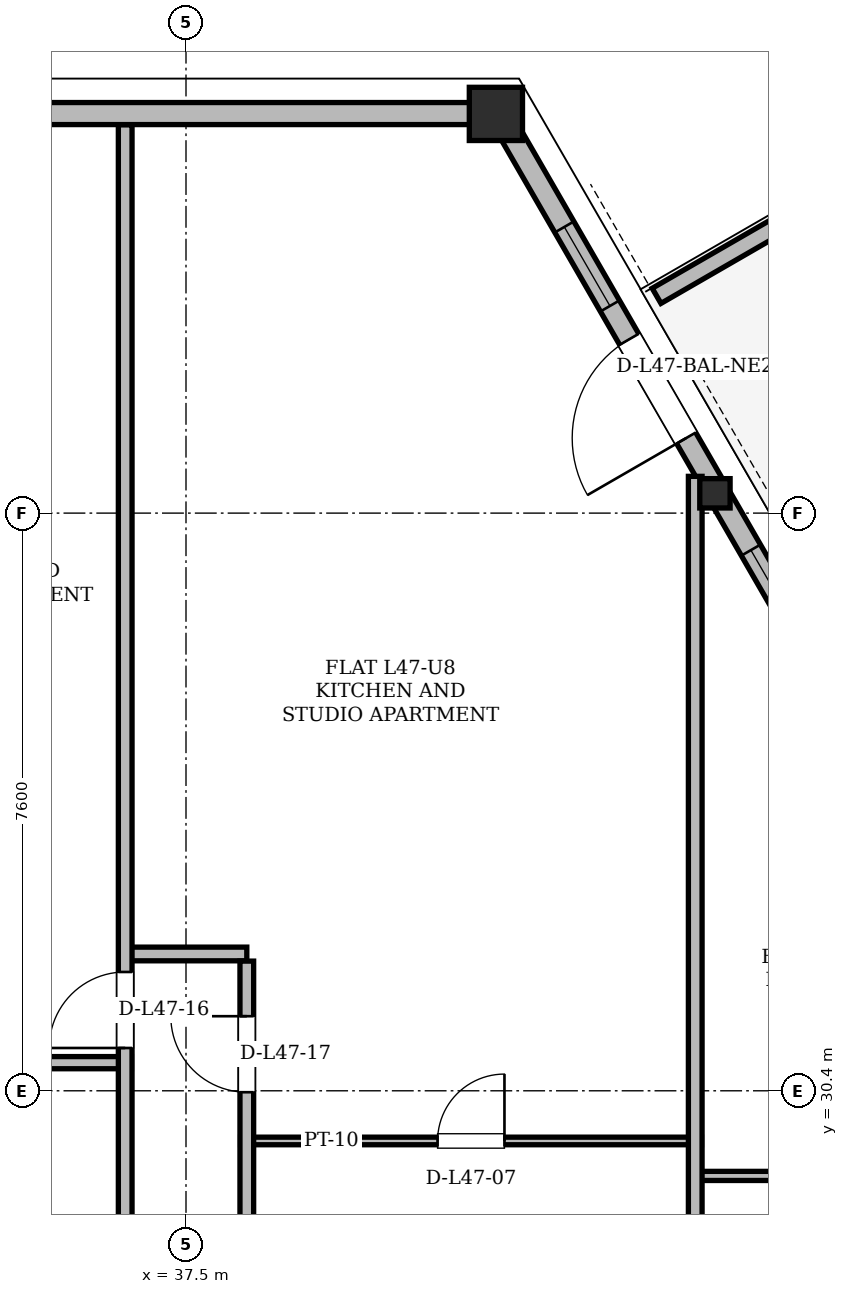
"""IFC4 building model, lengths in metres.
Left out: names, types, materials, properties, quantities, classifications, styles, units other than length and angle.
Written with IfcOpenShell. Run it as: python <this file> out.ifc"""

import sys

from ifc_helpers import new_model, si_unit, direction, frame, frame_2d, origin, origin_2d, place, context, subcontext, project, spatial, polyline, rectangle, hollow_rectangle, i_section, outline, extrude, element, fill, save


model = new_model("IFC4")
c1 = context("Model", 3, precision=1e-05, world=origin(), true_north=direction((0.0, 1.0)))
c2 = subcontext(c1, "Body", "Model", "MODEL_VIEW")
j1 = project(units=[si_unit("LENGTHUNIT", "METRE"), si_unit("PLANEANGLEUNIT", "RADIAN")], contexts=[c1])
p1 = place(None, origin())
s1 = spatial("IfcSite", under=j1, at=p1, CompositionType="ELEMENT")
p2 = place(p1, origin())
s2 = spatial("IfcBuilding", under=s1, at=p2, CompositionType="ELEMENT")
p3 = place(p2, frame((0.0, 0.0, 178.2)))
s3 = spatial("IfcBuildingStorey", under=s2, at=p3, CompositionType="ELEMENT", Elevation=178.2)
p4 = place(p3, frame((41.616, 43.257, 0.005), z_axis=(-0.02168370496, -0.002583011876, 0.999761544064), x_axis=(0.118285967789, -0.992979571705, 0.0)))
e1 = element("IfcColumn", 1, at=p4, inside=s3, PredefinedType="COLUMN", context=c2, shape_type="SweptSolid", body=[
    extrude(hollow_rectangle(XDim=0.7, YDim=0.7, WallThickness=0.055, at=origin_2d()), origin(), (0.0, 0.0, 1.0), 3.592),
])
p5 = place(p3, frame((44.496, 38.269, 0.005), z_axis=(-0.02032462297, -0.004962198919, 0.999781119187), x_axis=(0.237180560732, -0.971465584368, 0.0)))
e2 = element("IfcColumn", 2, at=p5, inside=s3, PredefinedType="COLUMN", context=c2, shape_type="SweptSolid", body=[
    extrude(i_section(OverallWidth=0.399, OverallDepth=0.386, WebThickness=0.021, FlangeThickness=0.033, at=origin_2d()), origin(), (0.0, 0.0, 1.0), 3.592),
])
p6 = place(p3, frame((59.612, 12.087, 0.0), z_axis=(0.0, 0.0, 1.0), x_axis=(-0.499997641637, 0.866026765382, 0.0)))
e3 = element("IfcWall", 3, at=p6, inside=s3, PredefinedType="SOLIDWALL", context=c2, shape_type="SweptSolid", body=[
    extrude(rectangle(XDim=35.992, YDim=0.29, at=frame_2d((17.996, 0.0))), origin(), (0.0, 0.0, 1.0), 2.6),
])
p7 = place(p6, frame((8.034, 0.0, 0.0)))
e4 = element("IfcOpeningElement", 4, at=p7, cuts=e3, PredefinedType="OPENING", context=c2, shape_type="SweptSolid", body=[
    extrude(rectangle(XDim=1.5, YDim=2.2, at=frame_2d((0.75, 1.1))), frame((0.0, 0.145, 0.0), z_axis=(0.0, -1.0, 0.0), x_axis=(1.0, 0.0, 0.0)), (0.0, 0.0, 1.0), 0.29),
])
p8 = place(p6, frame((31.062, 0.0, 0.0)))
e5 = element("IfcOpeningElement", 5, at=p8, cuts=e3, PredefinedType="OPENING", context=c2, shape_type="SweptSolid", body=[
    extrude(rectangle(XDim=1.5, YDim=2.2, at=frame_2d((0.75, 1.1))), frame((0.0, 0.145, 0.0), z_axis=(0.0, -1.0, 0.0), x_axis=(1.0, 0.0, 0.0)), (0.0, 0.0, 1.0), 0.29),
])
p9 = place(p6, frame((28.16, 0.0, 0.85)))
e6 = element("IfcOpeningElement", 6, at=p9, cuts=e3, PredefinedType="OPENING", context=c2, shape_type="SweptSolid", body=[
    extrude(rectangle(XDim=1.2, YDim=1.48, at=frame_2d((0.6, 0.74))), frame((0.0, 0.145, 0.0), z_axis=(0.0, -1.0, 0.0), x_axis=(1.0, 0.0, 0.0)), (0.0, 0.0, 1.0), 0.29),
])
p10 = place(p6, frame((33.069, 0.0, 0.85)))
e7 = element("IfcOpeningElement", 7, at=p10, cuts=e3, PredefinedType="OPENING", context=c2, shape_type="SweptSolid", body=[
    extrude(rectangle(XDim=1.2, YDim=1.48, at=frame_2d((0.6, 0.74))), frame((0.0, 0.145, 0.0), z_axis=(0.0, -1.0, 0.0), x_axis=(1.0, 0.0, 0.0)), (0.0, 0.0, 1.0), 0.29),
])
p11 = place(p6, frame((14.916, 0.0, 0.85)))
e8 = element("IfcOpeningElement", 8, at=p11, cuts=e3, PredefinedType="OPENING", context=c2, shape_type="SweptSolid", body=[
    extrude(rectangle(XDim=1.4, YDim=1.6, at=frame_2d((0.7, 0.8))), frame((0.0, 0.145, 0.0), z_axis=(0.0, -1.0, 0.0), x_axis=(1.0, 0.0, 0.0)), (0.0, 0.0, 1.0), 0.29),
])
p12 = place(p6, frame((17.971, 0.0, 0.85)))
e9 = element("IfcOpeningElement", 9, at=p12, cuts=e3, PredefinedType="OPENING", context=c2, shape_type="SweptSolid", body=[
    extrude(rectangle(XDim=1.2, YDim=1.48, at=frame_2d((0.6, 0.74))), frame((0.0, 0.145, 0.0), z_axis=(0.0, -1.0, 0.0), x_axis=(1.0, 0.0, 0.0)), (0.0, 0.0, 1.0), 0.29),
])
p13 = place(p6, frame((21.213, 0.0, 0.85)))
e10 = element("IfcOpeningElement", 10, at=p13, cuts=e3, PredefinedType="OPENING", context=c2, shape_type="SweptSolid", body=[
    extrude(rectangle(XDim=1.2, YDim=1.48, at=frame_2d((0.6, 0.74))), frame((0.0, 0.145, 0.0), z_axis=(0.0, -1.0, 0.0), x_axis=(1.0, 0.0, 0.0)), (0.0, 0.0, 1.0), 0.29),
])
p14 = place(p6, frame((26.453, 0.0, 0.85)))
e11 = element("IfcOpeningElement", 11, at=p14, cuts=e3, PredefinedType="OPENING", context=c2, shape_type="SweptSolid", body=[
    extrude(rectangle(XDim=1.2, YDim=1.48, at=frame_2d((0.6, 0.74))), frame((0.0, 0.145, 0.0), z_axis=(0.0, -1.0, 0.0), x_axis=(1.0, 0.0, 0.0)), (0.0, 0.0, 1.0), 0.29),
])
p15 = place(p3, frame((41.616, 43.257, 0.0), z_axis=(0.0, 0.0, 1.0), x_axis=(-1.0, 0.0, 0.0)))
e12 = element("IfcWall", 12, at=p15, inside=s3, PredefinedType="SOLIDWALL", context=c2, shape_type="SweptSolid", body=[
    extrude(rectangle(XDim=8.233, YDim=0.29, at=frame_2d((4.116, 0.0))), origin(), (0.0, 0.0, 1.0), 2.6),
])
p16 = place(p3, frame((43.691, 40.858, 0.0), z_axis=(0.0, 0.0, 1.0), x_axis=(0.866042246008, 0.499970827278, 0.0)))
e13 = element("IfcWall", 13, at=p16, inside=s3, PredefinedType="PARAPET", context=c2, shape_type="SweptSolid", body=[
    extrude(outline(polyline([(0.0, 0.0), (2.042, 0.0), (2.042, 1.1), (0.0, 1.32), (0.0, 0.0)])), frame((0.0, 0.115, 0.0), z_axis=(0.0, -1.0, 0.0), x_axis=(1.0, 0.0, 0.0)), (0.0, 0.0, 1.0), 0.23),
])
p17 = place(p3, frame((44.118, 29.28, 0.0), z_axis=(0.0, 0.0, 1.0), x_axis=(1.0, 0.0, 0.0)))
e14 = element("IfcWall", 14, at=p17, inside=s3, PredefinedType="PARTITIONING", context=c2, shape_type="SweptSolid", body=[
    extrude(rectangle(XDim=5.396, YDim=0.12, at=frame_2d((2.698, 0.0))), origin(), (0.0, 0.0, 1.0), 3.38),
])
p18 = place(p17, frame((2.3, 0.0, 0.0)))
e15 = element("IfcOpeningElement", 15, at=p18, cuts=e14, PredefinedType="OPENING", context=c2, shape_type="SweptSolid", body=[
    extrude(rectangle(XDim=0.88, YDim=2.08, at=frame_2d((0.44, 1.04))), frame((0.0, 0.06, 0.0), z_axis=(0.0, -1.0, 0.0), x_axis=(1.0, 0.0, 0.0)), (0.0, 0.0, 1.0), 0.12),
])
p19 = place(p3, frame((38.218, 29.74, 0.0), z_axis=(0.0, 0.0, 1.0), x_axis=(1.0, 0.0, 0.0)))
e16 = element("IfcWall", 16, at=p19, inside=s3, PredefinedType="PARTITIONING", context=c2, shape_type="SweptSolid", body=[
    extrude(rectangle(XDim=6.064, YDim=0.1, at=frame_2d((3.032, 0.0))), origin(), (0.0, 0.0, 1.0), 3.38),
])
p20 = place(p19, frame((2.592, 0.0, 0.0)))
e17 = element("IfcOpeningElement", 17, at=p20, cuts=e16, PredefinedType="OPENING", context=c2, shape_type="SweptSolid", body=[
    extrude(rectangle(XDim=0.88, YDim=2.08, at=frame_2d((0.44, 1.04))), frame((0.0, 0.05, 0.0), z_axis=(0.0, -1.0, 0.0), x_axis=(1.0, 0.0, 0.0)), (0.0, 0.0, 1.0), 0.1),
])
p21 = place(p3, frame((32.918, 30.77, 0.0), z_axis=(0.0, 0.0, 1.0), x_axis=(1.0, 0.0, 0.0)))
e18 = element("IfcWall", 18, at=p21, inside=s3, PredefinedType="PARTITIONING", context=c2, shape_type="SweptSolid", body=[
    extrude(rectangle(XDim=3.864, YDim=0.16, at=frame_2d((1.932, 0.0))), origin(), (0.0, 0.0, 1.0), 3.38),
])
p22 = place(p21, frame((1.492, 0.0, 0.0)))
e19 = element("IfcOpeningElement", 19, at=p22, cuts=e18, PredefinedType="OPENING", context=c2, shape_type="SweptSolid", body=[
    extrude(rectangle(XDim=0.88, YDim=2.08, at=frame_2d((0.44, 1.04))), frame((0.0, 0.08, 0.0), z_axis=(0.0, -1.0, 0.0), x_axis=(1.0, 0.0, 0.0)), (0.0, 0.0, 1.0), 0.16),
])
p23 = place(p3, frame((36.7, 32.2, 0.0), z_axis=(0.0, 0.0, 1.0), x_axis=(1.0, 0.0, 0.0)))
e20 = element("IfcWall", 20, at=p23, inside=s3, PredefinedType="PARTITIONING", context=c2, shape_type="SweptSolid", body=[
    extrude(rectangle(XDim=1.6, YDim=0.18, at=frame_2d((0.8, 0.0))), origin(), (0.0, 0.0, 1.0), 3.38),
])
p24 = place(p3, frame((36.7, 26.064, 0.0), z_axis=(0.0, 0.0, 1.0), x_axis=(0.0, 1.0, 0.0)))
e21 = element("IfcWall", 21, at=p24, inside=s3, PredefinedType="PARTITIONING", context=c2, shape_type="SweptSolid", body=[
    extrude(rectangle(XDim=17.044, YDim=0.18, at=frame_2d((8.522, 0.0))), origin(), (0.0, 0.0, 1.0), 3.38),
])
p25 = place(p24, frame((4.899, 0.0, 0.0)))
e22 = element("IfcOpeningElement", 22, at=p25, cuts=e21, PredefinedType="OPENING", context=c2, shape_type="SweptSolid", body=[
    extrude(rectangle(XDim=1.0, YDim=2.18, at=frame_2d((0.5, 1.09))), frame((0.0, 0.09, 0.0), z_axis=(0.0, -1.0, 0.0), x_axis=(1.0, 0.0, 0.0)), (0.0, 0.0, 1.0), 0.18),
])
p26 = place(p3, frame((38.3, 26.064, 0.0), z_axis=(0.0, 0.0, 1.0), x_axis=(0.0, 1.0, 0.0)))
e23 = element("IfcWall", 23, at=p26, inside=s3, PredefinedType="PARTITIONING", context=c2, shape_type="SweptSolid", body=[
    extrude(rectangle(XDim=6.042, YDim=0.18, at=frame_2d((3.021, 0.0))), origin(), (0.0, 0.0, 1.0), 3.38),
])
p27 = place(p26, frame((4.317, 0.0, 0.0)))
e24 = element("IfcOpeningElement", 24, at=p27, cuts=e23, PredefinedType="OPENING", context=c2, shape_type="SweptSolid", body=[
    extrude(rectangle(XDim=1.0, YDim=2.18, at=frame_2d((0.5, 1.09))), frame((0.0, 0.09, 0.0), z_axis=(0.0, -1.0, 0.0), x_axis=(1.0, 0.0, 0.0)), (0.0, 0.0, 1.0), 0.18),
])
p28 = place(p3, frame((44.2, 26.064, 0.0), z_axis=(0.0, 0.0, 1.0), x_axis=(0.0, 1.0, 0.0)))
e25 = element("IfcWall", 25, at=p28, inside=s3, PredefinedType="PARTITIONING", context=c2, shape_type="SweptSolid", body=[
    extrude(rectangle(XDim=12.42, YDim=0.18, at=frame_2d((6.21, 0.0))), origin(), (0.0, 0.0, 1.0), 2.842),
])
p29 = place(p8, origin())
e26 = element("IfcDoor", 26, at=p29, inside=s3, OperationType="SINGLE_SWING_LEFT", PredefinedType="DOOR", context=c2, shape_type="SweptSolid", body=[
    extrude(rectangle(XDim=1.5, YDim=2.2, at=frame_2d((0.75, 1.1))), frame((0.0, 0.025, 0.0), z_axis=(0.0, -1.0, 0.0), x_axis=(1.0, 0.0, 0.0)), (0.0, 0.0, 1.0), 0.05),
])
fill(e5, e26)
p30 = place(p9, origin())
e27 = element("IfcWindow", 27, at=p30, inside=s3, PartitioningType="SINGLE_PANEL", PredefinedType="WINDOW", context=c2, shape_type="SweptSolid", body=[
    extrude(rectangle(XDim=1.2, YDim=1.48, at=frame_2d((0.6, 0.74))), frame((0.0, 0.03, 0.0), z_axis=(0.0, -1.0, 0.0), x_axis=(1.0, 0.0, 0.0)), (0.0, 0.0, 1.0), 0.06),
])
fill(e6, e27)
p31 = place(p10, origin())
e28 = element("IfcWindow", 28, at=p31, inside=s3, PartitioningType="SINGLE_PANEL", PredefinedType="WINDOW", context=c2, shape_type="SweptSolid", body=[
    extrude(rectangle(XDim=1.2, YDim=1.48, at=frame_2d((0.6, 0.74))), frame((0.0, 0.03, 0.0), z_axis=(0.0, -1.0, 0.0), x_axis=(1.0, 0.0, 0.0)), (0.0, 0.0, 1.0), 0.06),
])
fill(e7, e28)
p32 = place(p20, origin())
e29 = element("IfcDoor", 29, at=p32, inside=s3, OperationType="SINGLE_SWING_RIGHT", PredefinedType="DOOR", context=c2, shape_type="SweptSolid", body=[
    extrude(rectangle(XDim=0.88, YDim=2.08, at=frame_2d((0.44, 1.04))), frame((0.0, 0.025, 0.0), z_axis=(0.0, -1.0, 0.0), x_axis=(1.0, 0.0, 0.0)), (0.0, 0.0, 1.0), 0.05),
])
fill(e17, e29)
p33 = place(p25, origin())
e30 = element("IfcDoor", 30, at=p33, inside=s3, OperationType="SINGLE_SWING_LEFT", PredefinedType="DOOR", context=c2, shape_type="SweptSolid", body=[
    extrude(rectangle(XDim=1.0, YDim=2.18, at=frame_2d((0.5, 1.09))), frame((0.0, 0.025, 0.0), z_axis=(0.0, -1.0, 0.0), x_axis=(1.0, 0.0, 0.0)), (0.0, 0.0, 1.0), 0.05),
])
fill(e22, e30)
p34 = place(p27, origin())
e31 = element("IfcDoor", 31, at=p34, inside=s3, OperationType="SINGLE_SWING_RIGHT", PredefinedType="DOOR", context=c2, shape_type="SweptSolid", body=[
    extrude(rectangle(XDim=1.0, YDim=2.18, at=frame_2d((0.5, 1.09))), frame((0.0, 0.025, 0.0), z_axis=(0.0, -1.0, 0.0), x_axis=(1.0, 0.0, 0.0)), (0.0, 0.0, 1.0), 0.05),
])
fill(e24, e31)
save(model, sys.argv[1])
